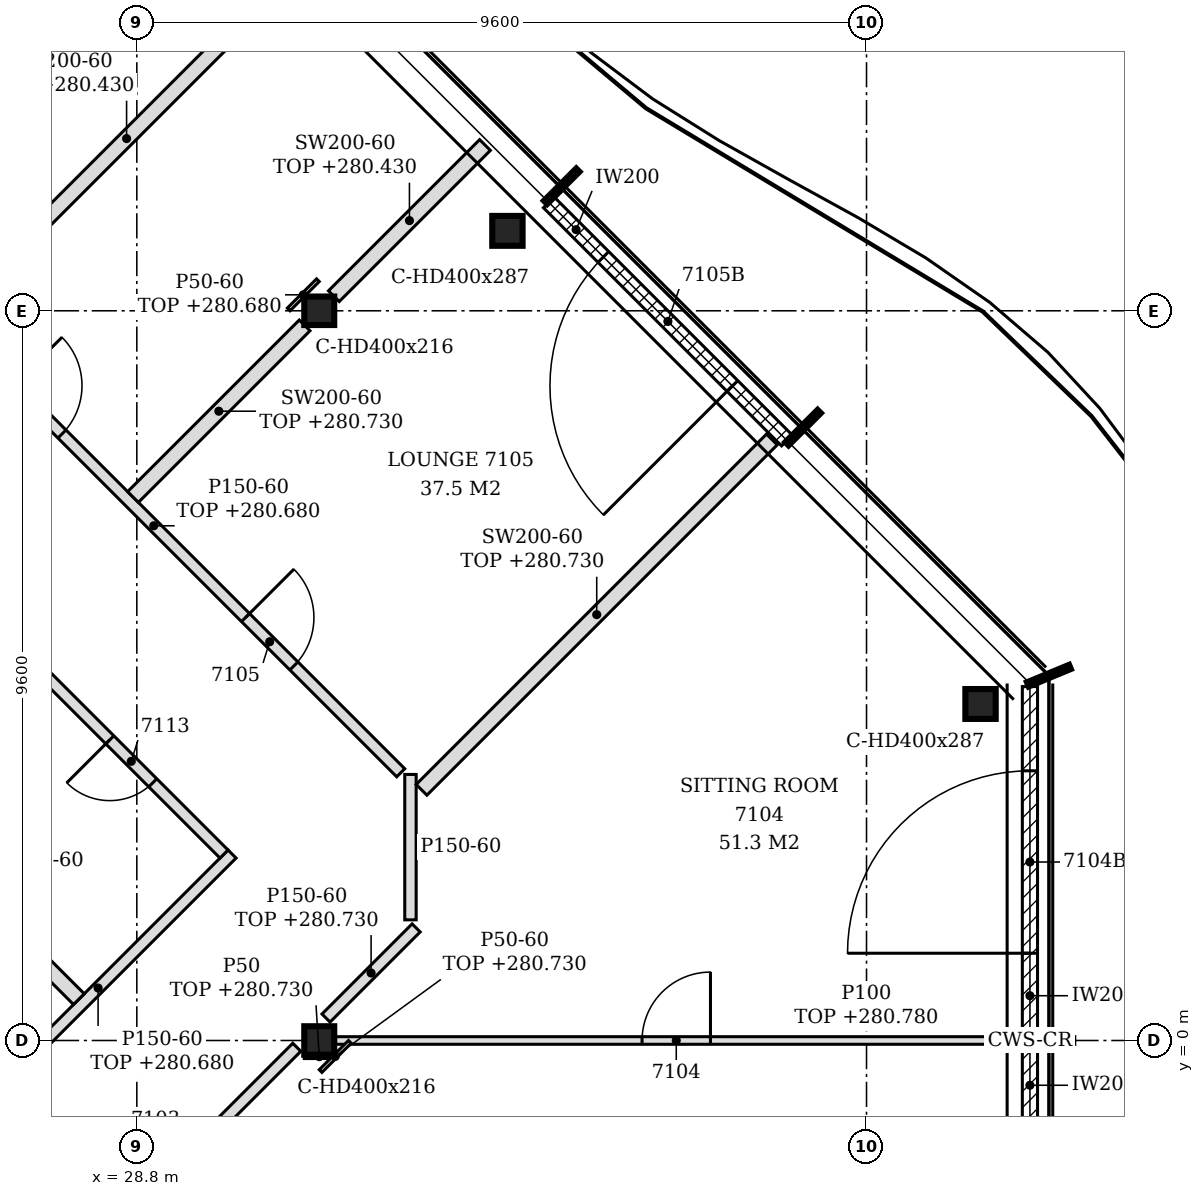
"""IFC4 building model, lengths in metres.
Left out: names, types, materials, properties, quantities, classifications, styles, units other than length and angle.
Written with IfcOpenShell. Run it as: python <this file> out.ifc"""

import sys

from ifc_helpers import new_model, si_unit, direction, frame, frame_2d, origin, origin_2d, place, context, subcontext, project, spatial, polyline, rectangle, i_section, outline, extrude, element, fill, save


model = new_model("IFC4")
c1 = context("Model", 3, precision=1e-05, world=origin(), true_north=direction((0.0, 1.0)))
c2 = subcontext(c1, "Body", "Model", "MODEL_VIEW")
j1 = project(units=[si_unit("LENGTHUNIT", "METRE"), si_unit("PLANEANGLEUNIT", "RADIAN")], contexts=[c1])
p1 = place(None, origin())
s1 = spatial("IfcSite", under=j1, at=p1, CompositionType="ELEMENT")
p2 = place(p1, origin())
s2 = spatial("IfcBuilding", under=s1, at=p2, CompositionType="ELEMENT")
p3 = place(p2, frame((0.0, 0.0, 277.8)))
s3 = spatial("IfcBuildingStorey", under=s2, at=p3, CompositionType="ELEMENT", Elevation=277.8)
for number, where, z_axis, x_axis in (
    (1, (39.9, 4.427, -0.15), (0.0, 0.0, 1.0), (1.0, 0.0, 0.0)),
    (2, (33.676, 10.652, -0.15), (0.0, 0.0, 1.0), (1.0, 0.0, 0.0)),
):
    element("IfcColumn", number, at=place(p3, frame(where, z_axis=z_axis, x_axis=x_axis)), inside=s3, PredefinedType="COLUMN", context=c2, shape_type="SweptSolid", body=[
        extrude(i_section(OverallWidth=0.399, OverallDepth=0.393, WebThickness=0.023, FlangeThickness=0.037, FilletRadius=0.015, at=origin_2d()), origin(), (0.0, 0.0, 1.0), 3.6),
    ])
for number, where, z_axis, x_axis in (
    (3, (31.2, 0.0, -0.15), (0.0, 0.0, 1.0), (1.0, 0.0, 0.0)),
    (4, (31.2, 9.6, -0.15), (0.0, 0.0, 1.0), (1.0, 0.0, 0.0)),
):
    element("IfcColumn", number, at=place(p3, frame(where, z_axis=z_axis, x_axis=x_axis)), inside=s3, PredefinedType="COLUMN", context=c2, shape_type="SweptSolid", body=[
        extrude(i_section(OverallWidth=0.394, OverallDepth=0.375, WebThickness=0.017, FlangeThickness=0.028, FilletRadius=0.015, at=origin_2d()), origin(), (0.0, 0.0, 1.0), 3.6),
    ])
p4 = place(p3, frame((40.55, -4.656, 0.0), z_axis=(0.0, 0.0, 1.0), x_axis=(0.0, 1.0, 0.0)))
e5 = element("IfcWall", 5, at=p4, inside=s3, PredefinedType="NOTDEFINED", context=c2, shape_type="SweptSolid", body=[
    extrude(rectangle(XDim=4.626, YDim=0.2, at=frame_2d((2.313, 0.0))), origin(), (0.0, 0.0, 1.0), 3.45),
])
p5 = place(p4, frame((1.108, 0.0, 0.0)))
e6 = element("IfcOpeningElement", 6, at=p5, cuts=e5, PredefinedType="OPENING", context=c2, shape_type="SweptSolid", body=[
    extrude(rectangle(XDim=2.4, YDim=2.4, at=frame_2d((1.2, 1.2))), frame((0.0, 0.11, 0.0), z_axis=(0.0, -1.0, 0.0), x_axis=(1.0, 0.0, 0.0)), (0.0, 0.0, 1.0), 0.22),
])
p6 = place(p3, frame((40.55, 0.03, 0.0), z_axis=(0.0, 0.0, 1.0), x_axis=(0.0, 1.0, 0.0)))
e7 = element("IfcWall", 7, at=p6, inside=s3, PredefinedType="NOTDEFINED", context=c2, shape_type="SweptSolid", body=[
    extrude(rectangle(XDim=4.626, YDim=0.2, at=frame_2d((2.313, 0.0))), origin(), (0.0, 0.0, 1.0), 3.45),
])
p7 = place(p6, frame((1.118, 0.0, 0.0)))
e8 = element("IfcOpeningElement", 8, at=p7, cuts=e7, PredefinedType="OPENING", context=c2, shape_type="SweptSolid", body=[
    extrude(rectangle(XDim=2.4, YDim=2.4, at=frame_2d((1.2, 1.2))), frame((0.0, 0.11, 0.0), z_axis=(0.0, -1.0, 0.0), x_axis=(1.0, 0.0, 0.0)), (0.0, 0.0, 1.0), 0.22),
])
p8 = place(p3, frame((37.353, 7.893, 0.0), z_axis=(0.0, 0.0, 1.0), x_axis=(-0.707134329907, 0.707079231393, 0.0)))
e9 = element("IfcWall", 9, at=p8, inside=s3, PredefinedType="NOTDEFINED", context=c2, shape_type="SweptSolid", body=[
    extrude(rectangle(XDim=4.431, YDim=0.2, at=frame_2d((2.215, 0.0))), origin(), (0.0, 0.0, 1.0), 3.45),
])
p9 = place(p8, frame((1.015, 0.0, 0.0)))
e10 = element("IfcOpeningElement", 10, at=p9, cuts=e9, PredefinedType="OPENING", context=c2, shape_type="SweptSolid", body=[
    extrude(rectangle(XDim=2.4, YDim=2.4, at=frame_2d((1.2, 1.2))), frame((0.0, 0.11, 0.0), z_axis=(0.0, -1.0, 0.0), x_axis=(1.0, 0.0, 0.0)), (0.0, 0.0, 1.0), 0.22),
])
p10 = place(p3, frame((13.122, -17.872, 0.0), z_axis=(0.0, 0.0, 1.0), x_axis=(0.707101927234, 0.707111635106, 0.0)))
e11 = element("IfcWall", 11, at=p10, inside=s3, PredefinedType="PARTITIONING", context=c2, shape_type="SweptSolid", body=[
    extrude(rectangle(XDim=25.149, YDim=0.15, at=frame_2d((12.574, 0.0))), origin(), (0.0, 0.0, 1.0), 2.73),
])
p11 = place(p10, frame((4.672, 0.0, 0.0)))
e12 = element("IfcOpeningElement", 12, at=p11, cuts=e11, PredefinedType="OPENING", context=c2, shape_type="SweptSolid", body=[
    extrude(rectangle(XDim=0.9, YDim=2.1, at=frame_2d((0.45, 1.05))), frame((0.0, 0.085, 0.0), z_axis=(0.0, -1.0, 0.0), x_axis=(1.0, 0.0, 0.0)), (0.0, 0.0, 1.0), 0.17),
])
p12 = place(p10, frame((14.284, 0.0, 0.0)))
e13 = element("IfcOpeningElement", 13, at=p12, cuts=e11, PredefinedType="OPENING", context=c2, shape_type="SweptSolid", body=[
    extrude(rectangle(XDim=0.9, YDim=2.1, at=frame_2d((0.45, 1.05))), frame((0.0, 0.085, 0.0), z_axis=(0.0, -1.0, 0.0), x_axis=(1.0, 0.0, 0.0)), (0.0, 0.0, 1.0), 0.17),
])
p13 = place(p10, frame((22.704, 0.0, 0.0)))
e14 = element("IfcOpeningElement", 14, at=p13, cuts=e11, PredefinedType="OPENING", context=c2, shape_type="SweptSolid", body=[
    extrude(rectangle(XDim=0.9, YDim=2.1, at=frame_2d((0.45, 1.05))), frame((0.0, 0.085, 0.0), z_axis=(0.0, -1.0, 0.0), x_axis=(1.0, 0.0, 0.0)), (0.0, 0.0, 1.0), 0.17),
])
p14 = place(p3, frame((26.528, -1.072, 0.0), z_axis=(0.0, 0.0, 1.0), x_axis=(0.707106781187, 0.707106781187, 0.0)))
e15 = element("IfcWall", 15, at=p14, inside=s3, PredefinedType="PARTITIONING", context=c2, shape_type="SweptSolid", body=[
    extrude(rectangle(XDim=4.985, YDim=0.15, at=frame_2d((2.492, 0.0))), origin(), (0.0, 0.0, 1.0), 2.88),
])
p15 = place(p3, frame((31.397, 0.0, 0.0), z_axis=(0.0, 0.0, 1.0), x_axis=(1.0, 0.0, 0.0)))
e16 = element("IfcWall", 16, at=p15, inside=s3, PredefinedType="PARTITIONING", context=c2, shape_type="SweptSolid", body=[
    extrude(outline(polyline([(0.0, 0.0), (9.053, 0.0), (9.053, 2.98), (8.653, 2.98), (8.651, 2.93), (8.353, 2.93), (8.351, 2.98), (0.0, 2.98), (0.0, 0.0)])), frame((0.0, 0.05, 0.0), z_axis=(0.0, -1.0, 0.0), x_axis=(1.0, 0.0, 0.0)), (0.0, 0.0, 1.0), 0.1),
])
p16 = place(p15, frame((4.05, 0.0, 0.0)))
e17 = element("IfcOpeningElement", 17, at=p16, cuts=e16, PredefinedType="OPENING", context=c2, shape_type="SweptSolid", body=[
    extrude(rectangle(XDim=0.9, YDim=2.1, at=frame_2d((0.45, 1.05))), frame((0.0, 0.06, 0.0), z_axis=(0.0, -1.0, 0.0), x_axis=(1.0, 0.0, 0.0)), (0.0, 0.0, 1.0), 0.12),
])
p17 = place(p3, frame((31.289, 0.295, 0.0), z_axis=(0.0, 0.0, 1.0), x_axis=(0.707106781187, 0.707106781187, 0.0)))
e18 = element("IfcWall", 18, at=p17, inside=s3, PredefinedType="PARTITIONING", context=c2, shape_type="SweptSolid", body=[
    extrude(rectangle(XDim=1.677, YDim=0.15, at=frame_2d((0.838, 0.0))), origin(), (0.0, 0.0, 1.0), 2.93),
])
p18 = place(p3, frame((28.038, 0.544, 0.0), z_axis=(0.0, 0.0, 1.0), x_axis=(-0.707213699878, 0.706999846325, 0.0)))
e19 = element("IfcWall", 19, at=p18, inside=s3, PredefinedType="PARTITIONING", context=c2, shape_type="SweptSolid", body=[
    extrude(rectangle(XDim=3.425, YDim=0.2, at=frame_2d((1.712, 0.0))), origin(), (0.0, 0.0, 1.0), 3.45),
])
p19 = place(p3, frame((32.4, 1.587, 0.0), z_axis=(0.0, 0.0, 1.0), x_axis=(0.0, 1.0, 0.0)))
e20 = element("IfcWall", 20, at=p19, inside=s3, PredefinedType="PARTITIONING", context=c2, shape_type="SweptSolid", body=[
    extrude(rectangle(XDim=1.913, YDim=0.15, at=frame_2d((0.957, 0.0))), origin(), (0.0, 0.0, 1.0), 3.45),
])
p20 = place(p3, frame((29.947, 2.453, 0.0), z_axis=(0.0, 0.0, 1.0), x_axis=(-0.707098603185, 0.707114959093, 0.0)))
e21 = element("IfcWall", 21, at=p20, inside=s3, PredefinedType="PARTITIONING", context=c2, shape_type="SweptSolid", body=[
    extrude(rectangle(XDim=14.927, YDim=0.15, at=frame_2d((7.463, 0.0))), origin(), (0.0, 0.0, 1.0), 2.88),
])
p21 = place(p20, frame((1.325, 0.0, 0.0)))
e22 = element("IfcOpeningElement", 22, at=p21, cuts=e21, PredefinedType="OPENING", context=c2, shape_type="SweptSolid", body=[
    extrude(rectangle(XDim=0.8, YDim=2.1, at=frame_2d((0.4, 1.05))), frame((0.0, 0.085, 0.0), z_axis=(0.0, -1.0, 0.0), x_axis=(1.0, 0.0, 0.0)), (0.0, 0.0, 1.0), 0.17),
])
p22 = place(p20, frame((4.476, 0.0, 0.0)))
e23 = element("IfcOpeningElement", 23, at=p22, cuts=e21, PredefinedType="OPENING", context=c2, shape_type="SweptSolid", body=[
    extrude(rectangle(XDim=0.8, YDim=2.1, at=frame_2d((0.4, 1.05))), frame((0.0, 0.085, 0.0), z_axis=(0.0, -1.0, 0.0), x_axis=(1.0, 0.0, 0.0)), (0.0, 0.0, 1.0), 0.17),
])
p23 = place(p3, frame((32.546, 3.298, 0.0), z_axis=(0.0, 0.0, 1.0), x_axis=(0.707106781187, 0.707106781187, 0.0)))
e24 = element("IfcWall", 24, at=p23, inside=s3, PredefinedType="PARTITIONING", context=c2, shape_type="SweptSolid", body=[
    extrude(rectangle(XDim=6.519, YDim=0.2, at=frame_2d((3.26, 0.0))), origin(), (0.0, 0.0, 1.0), 2.93),
])
p24 = place(p3, frame((32.272, 3.522, 0.0), z_axis=(0.0, 0.0, 1.0), x_axis=(-0.707106781187, 0.707106781187, 0.0)))
e25 = element("IfcWall", 25, at=p24, inside=s3, PredefinedType="PARTITIONING", context=c2, shape_type="SweptSolid", body=[
    extrude(rectangle(XDim=13.687, YDim=0.15, at=frame_2d((6.843, 0.0))), origin(), (0.0, 0.0, 1.0), 2.88),
])
p25 = place(p24, frame((1.988, 0.0, 0.0)))
e26 = element("IfcOpeningElement", 26, at=p25, cuts=e25, PredefinedType="OPENING", context=c2, shape_type="SweptSolid", body=[
    extrude(rectangle(XDim=0.9, YDim=2.1, at=frame_2d((0.45, 1.05))), frame((0.0, 0.085, 0.0), z_axis=(0.0, -1.0, 0.0), x_axis=(1.0, 0.0, 0.0)), (0.0, 0.0, 1.0), 0.17),
])
p26 = place(p24, frame((6.303, 0.0, 0.0)))
e27 = element("IfcOpeningElement", 27, at=p26, cuts=e25, PredefinedType="OPENING", context=c2, shape_type="SweptSolid", body=[
    extrude(rectangle(XDim=0.9, YDim=2.1, at=frame_2d((0.45, 1.05))), frame((0.0, 0.085, 0.0), z_axis=(0.0, -1.0, 0.0), x_axis=(1.0, 0.0, 0.0)), (0.0, 0.0, 1.0), 0.17),
])
p27 = place(p24, frame((10.2, 0.0, 0.0)))
e28 = element("IfcOpeningElement", 28, at=p27, cuts=e25, PredefinedType="OPENING", context=c2, shape_type="SweptSolid", body=[
    extrude(rectangle(XDim=0.9, YDim=2.1, at=frame_2d((0.45, 1.05))), frame((0.0, 0.085, 0.0), z_axis=(0.0, -1.0, 0.0), x_axis=(1.0, 0.0, 0.0)), (0.0, 0.0, 1.0), 0.17),
])
p28 = place(p3, frame((28.75, 7.15, 0.0), z_axis=(0.0, 0.0, 1.0), x_axis=(0.707106781187, 0.707106781187, 0.0)))
e29 = element("IfcWall", 29, at=p28, inside=s3, PredefinedType="PARTITIONING", context=c2, shape_type="SweptSolid", body=[
    extrude(rectangle(XDim=3.193, YDim=0.2, at=frame_2d((1.597, 0.0))), origin(), (0.0, 0.0, 1.0), 2.93),
])
p29 = place(p3, frame((26.35, 9.55, 0.0), z_axis=(0.0, 0.0, 1.0), x_axis=(0.707088140984, 0.707125420898, 0.0)))
e30 = element("IfcWall", 30, at=p29, inside=s3, PredefinedType="PARTITIONING", context=c2, shape_type="SweptSolid", body=[
    extrude(rectangle(XDim=6.549, YDim=0.2, at=frame_2d((3.274, 0.0))), origin(), (0.0, 0.0, 1.0), 2.63),
])
p30 = place(p3, frame((31.392, 9.792, 0.0), z_axis=(0.0, 0.0, 1.0), x_axis=(0.707106781187, 0.707106781187, 0.0)))
e31 = element("IfcWall", 31, at=p30, inside=s3, PredefinedType="PARTITIONING", context=c2, shape_type="SweptSolid", body=[
    extrude(rectangle(XDim=2.812, YDim=0.2, at=frame_2d((1.406, 0.0))), origin(), (0.0, 0.0, 1.0), 2.63),
])
p31 = place(p3, frame((31.218, -0.402, 0.0), z_axis=(0.0, 0.0, 1.0), x_axis=(0.707106781187, 0.707106781187, 0.0)))
e32 = element("IfcWall", 32, at=p31, inside=s3, PredefinedType="PARTITIONING", context=c2, shape_type="SweptSolid", body=[
    extrude(rectangle(XDim=0.544, YDim=0.05, at=frame_2d((0.272, 0.0))), origin(), (0.0, 0.0, 1.0), 2.93),
])
p32 = place(p3, frame((31.003, -0.212, 0.0), z_axis=(0.0, 0.0, 1.0), x_axis=(1.0, 0.0, 0.0)))
e33 = element("IfcWall", 33, at=p32, inside=s3, PredefinedType="PARTITIONING", context=c2, shape_type="SweptSolid", body=[
    extrude(rectangle(XDim=0.394, YDim=0.05, at=frame_2d((0.197, 0.0))), origin(), (0.0, 0.0, 1.0), 2.93),
])
p33 = place(p3, frame((30.798, 9.618, 0.0), z_axis=(0.0, 0.0, 1.0), x_axis=(0.707106781187, 0.707106781187, 0.0)))
e34 = element("IfcWall", 34, at=p33, inside=s3, PredefinedType="PARTITIONING", context=c2, shape_type="SweptSolid", body=[
    extrude(rectangle(XDim=0.544, YDim=0.05, at=frame_2d((0.272, 0.0))), origin(), (0.0, 0.0, 1.0), 2.88),
])
p34 = place(p7, origin())
e35 = element("IfcDoor", 35, at=p34, inside=s3, OperationType="SINGLE_SWING_LEFT", PredefinedType="DOOR", context=c2, shape_type="SweptSolid", body=[
    extrude(rectangle(XDim=2.4, YDim=2.4, at=frame_2d((1.2, 1.2))), frame((0.0, 0.025, 0.0), z_axis=(0.0, -1.0, 0.0), x_axis=(1.0, 0.0, 0.0)), (0.0, 0.0, 1.0), 0.05),
])
fill(e8, e35)
p35 = place(p9, origin())
e36 = element("IfcDoor", 36, at=p35, inside=s3, OperationType="SINGLE_SWING_LEFT", PredefinedType="DOOR", context=c2, shape_type="SweptSolid", body=[
    extrude(rectangle(XDim=2.4, YDim=2.4, at=frame_2d((1.2, 1.2))), frame((0.0, 0.025, 0.0), z_axis=(0.0, -1.0, 0.0), x_axis=(1.0, 0.0, 0.0)), (0.0, 0.0, 1.0), 0.05),
])
fill(e10, e36)
p36 = place(p16, origin())
e37 = element("IfcDoor", 37, at=p36, inside=s3, OperationType="SINGLE_SWING_RIGHT", PredefinedType="DOOR", context=c2, shape_type="SweptSolid", body=[
    extrude(rectangle(XDim=0.9, YDim=2.1, at=frame_2d((0.45, 1.05))), frame((0.0, 0.025, 0.0), z_axis=(0.0, -1.0, 0.0), x_axis=(1.0, 0.0, 0.0)), (0.0, 0.0, 1.0), 0.05),
])
fill(e17, e37)
p37 = place(p25, frame((0.9, 0.0, 0.0), z_axis=(0.0, 0.0, 1.0), x_axis=(-1.0, 0.0, 0.0)))
e38 = element("IfcDoor", 38, at=p37, inside=s3, OperationType="SINGLE_SWING_LEFT", PredefinedType="DOOR", context=c2, shape_type="SweptSolid", body=[
    extrude(rectangle(XDim=0.9, YDim=2.1, at=frame_2d((0.45, 1.05))), frame((0.0, 0.025, 0.0), z_axis=(0.0, -1.0, 0.0), x_axis=(1.0, 0.0, 0.0)), (0.0, 0.0, 1.0), 0.05),
])
fill(e26, e38)
p38 = place(p26, frame((0.9, 0.0, 0.0), z_axis=(0.0, 0.0, 1.0), x_axis=(-1.0, 0.0, 0.0)))
e39 = element("IfcDoor", 39, at=p38, inside=s3, OperationType="SINGLE_SWING_LEFT", PredefinedType="DOOR", context=c2, shape_type="SweptSolid", body=[
    extrude(rectangle(XDim=0.9, YDim=2.1, at=frame_2d((0.45, 1.05))), frame((0.0, 0.025, 0.0), z_axis=(0.0, -1.0, 0.0), x_axis=(1.0, 0.0, 0.0)), (0.0, 0.0, 1.0), 0.05),
])
fill(e27, e39)
p39 = place(p21, origin())
e40 = element("IfcDoor", 40, at=p39, inside=s3, OperationType="SINGLE_SWING_RIGHT", PredefinedType="DOOR", context=c2, shape_type="SweptSolid", body=[
    extrude(rectangle(XDim=0.8, YDim=2.1, at=frame_2d((0.4, 1.05))), frame((0.0, 0.025, 0.0), z_axis=(0.0, -1.0, 0.0), x_axis=(1.0, 0.0, 0.0)), (0.0, 0.0, 1.0), 0.05),
])
fill(e22, e40)
save(model, sys.argv[1])
